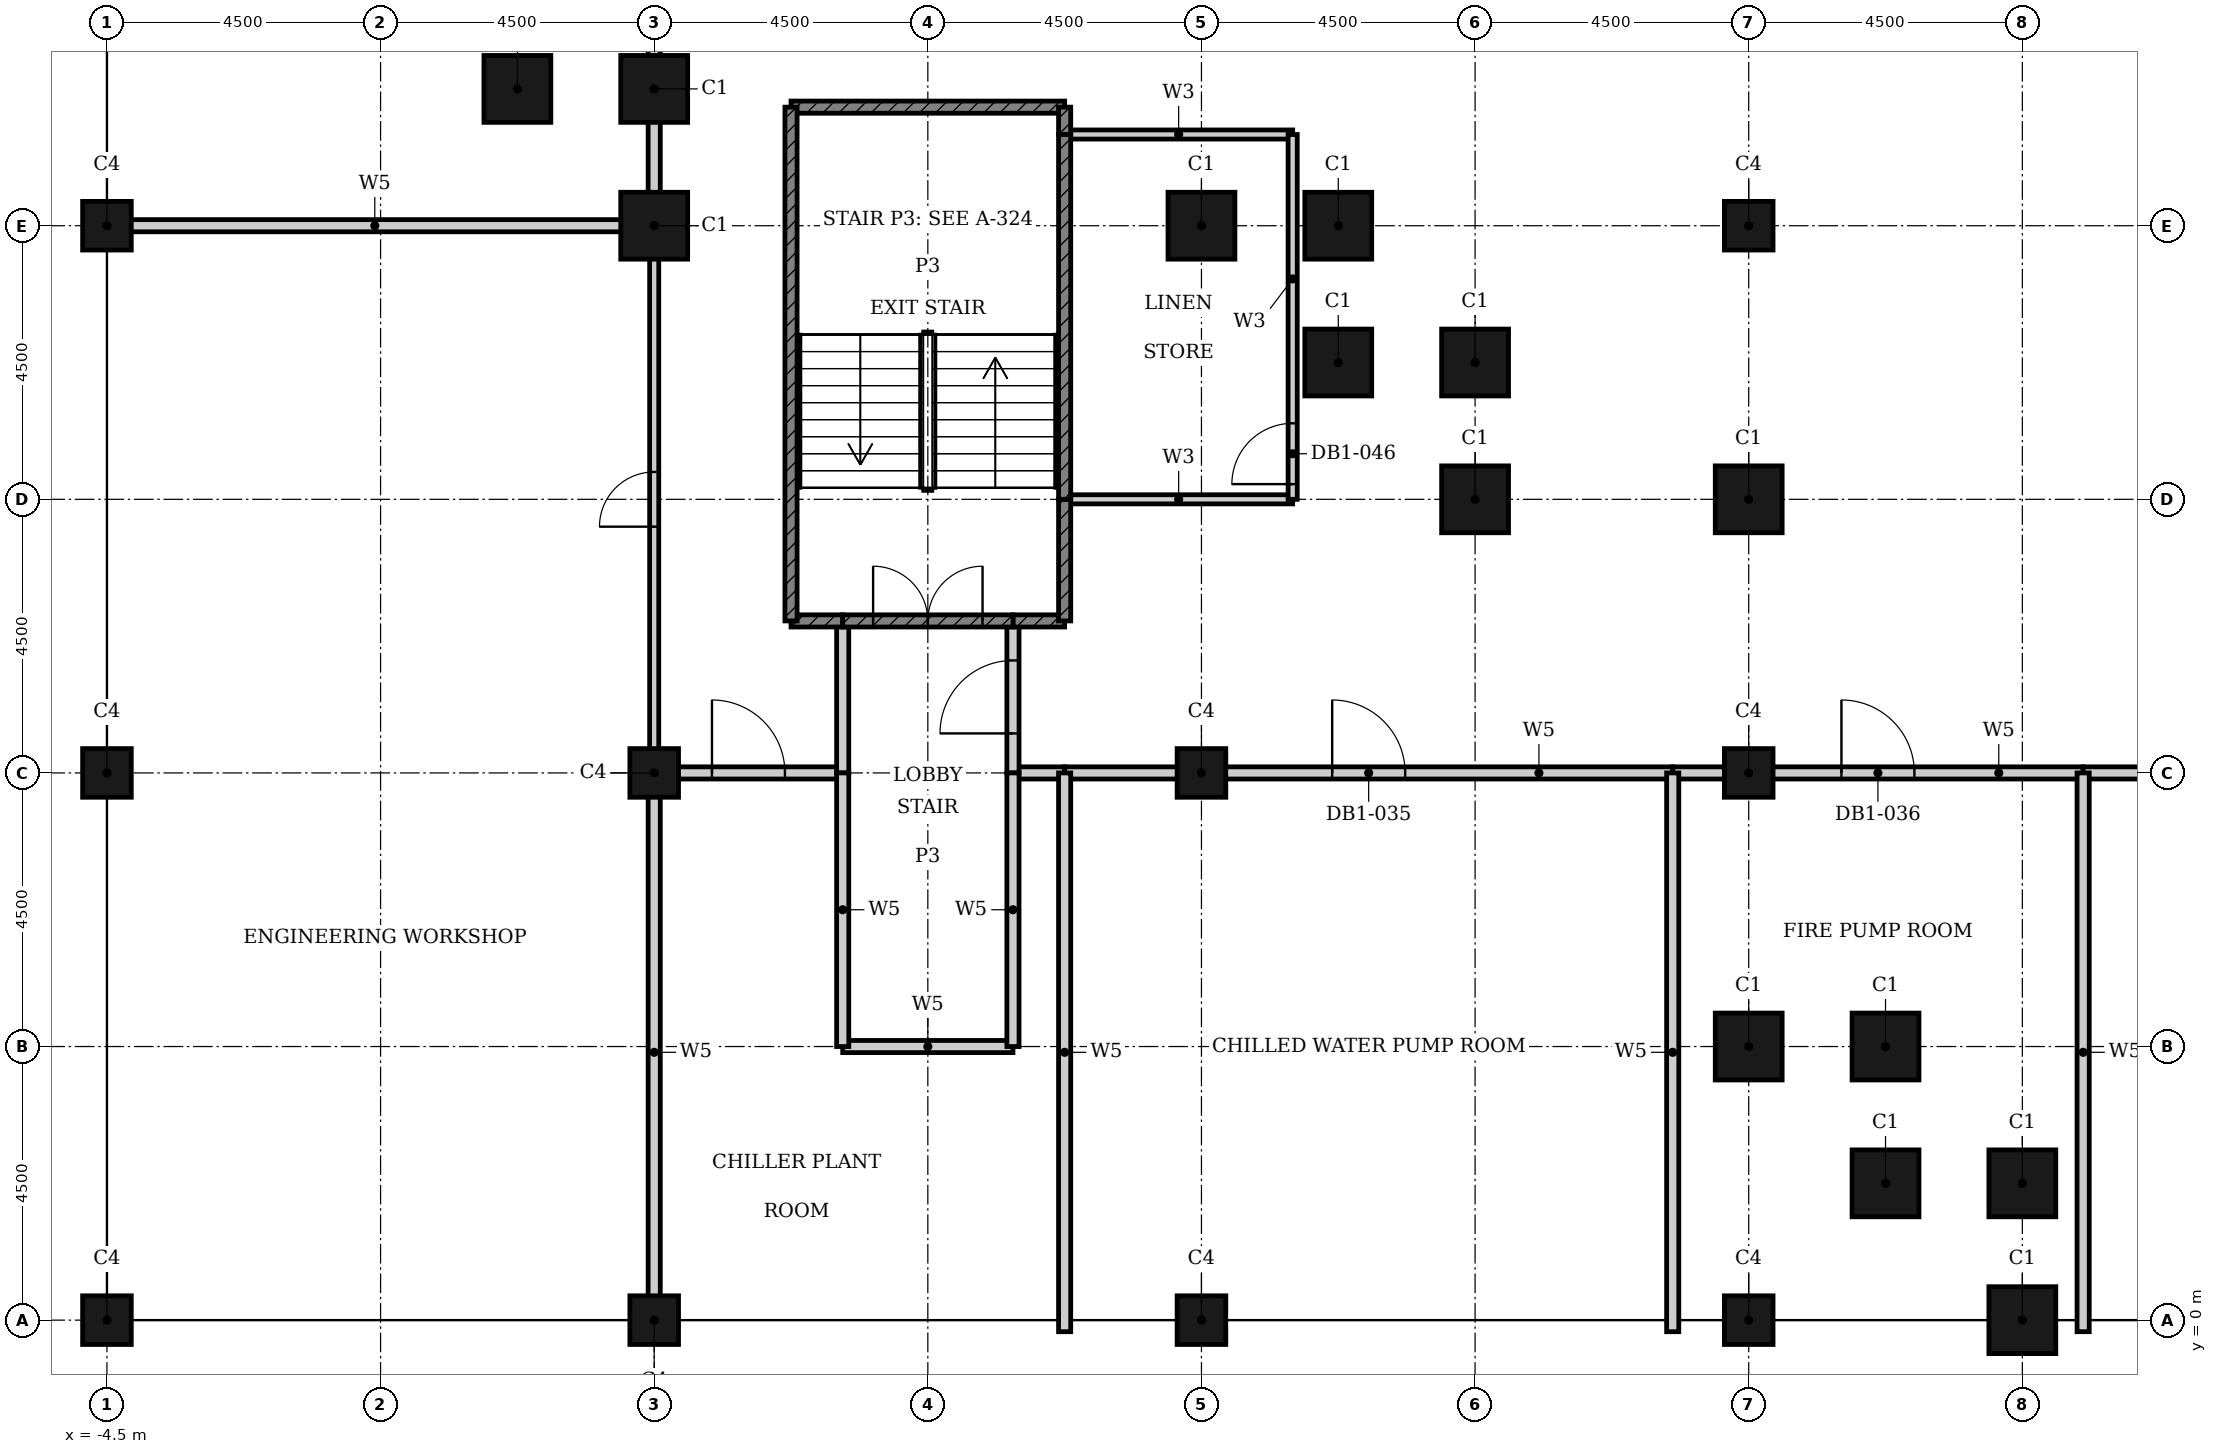
"""IFC4 building model, lengths in metres.
Left out: names, types, materials, properties, quantities, classifications, styles, units other than length and angle.
Written with IfcOpenShell. Run it as: python <this file> out.ifc"""

import sys

from ifc_helpers import new_model, si_unit, direction, frame, frame_2d, origin, origin_2d, place, context, subcontext, project, spatial, rectangle, hollow_rectangle, extrude, element, fill, save


model = new_model("IFC4")
c1 = context("Model", 3, precision=1e-05, world=origin(), true_north=direction((0.0, 1.0)))
c2 = subcontext(c1, "Body", "Model", "MODEL_VIEW")
j1 = project(units=[si_unit("LENGTHUNIT", "METRE"), si_unit("PLANEANGLEUNIT", "RADIAN")], contexts=[c1])
p1 = place(None, origin())
s1 = spatial("IfcSite", under=j1, at=p1, CompositionType="ELEMENT")
p2 = place(p1, origin())
s2 = spatial("IfcBuilding", under=s1, at=p2, CompositionType="ELEMENT")
p3 = place(p2, frame((0.0, 0.0, -6.0)))
s3 = spatial("IfcBuildingStorey", under=s2, at=p3, CompositionType="ELEMENT", Elevation=-6.0)
for number, where, z_axis, x_axis in (
    (1, (22.5, 4.5, -0.5), (0.0, 0.0, 1.0), (1.0, 0.0, 0.0)),
    (2, (24.75, 4.5, -0.5), (0.0, 0.0, 1.0), (1.0, 0.0, 0.0)),
    (3, (24.75, 2.25, -0.5), (0.0, 0.0, 1.0), (1.0, 0.0, 0.0)),
    (4, (27.0, 2.25, -0.5), (0.0, 0.0, 1.0), (1.0, 0.0, 0.0)),
    (5, (27.0, 0.0, -0.5), (0.0, 0.0, 1.0), (1.0, 0.0, 0.0)),
    (6, (2.25, 20.25, -0.5), (0.0, 0.0, 1.0), (1.0, 0.0, 0.0)),
    (7, (4.5, 20.25, -0.5), (0.0, 0.0, 1.0), (1.0, 0.0, 0.0)),
    (8, (4.5, 18.0, -0.5), (0.0, 0.0, 1.0), (1.0, 0.0, 0.0)),
    (9, (13.5, 18.0, -0.5), (0.0, 0.0, 1.0), (1.0, 0.0, 0.0)),
    (10, (15.75, 18.0, -0.5), (0.0, 0.0, 1.0), (1.0, 0.0, 0.0)),
    (11, (15.75, 15.75, -0.5), (0.0, 0.0, 1.0), (1.0, 0.0, 0.0)),
    (12, (18.0, 15.75, -0.5), (0.0, 0.0, 1.0), (1.0, 0.0, 0.0)),
    (13, (18.0, 13.5, -0.5), (0.0, 0.0, 1.0), (1.0, 0.0, 0.0)),
    (14, (22.5, 13.5, -0.5), (0.0, 0.0, 1.0), (1.0, 0.0, 0.0)),
):
    element("IfcColumn", number, at=place(p3, frame(where, z_axis=z_axis, x_axis=x_axis)), inside=s3, PredefinedType="COLUMN", context=c2, shape_type="SweptSolid", body=[
        extrude(hollow_rectangle(XDim=1.1, YDim=1.1, WallThickness=0.036, at=origin_2d()), origin(), (0.0, 0.0, 1.0), 6.5),
    ])
for number, where, z_axis, x_axis in (
    (15, (-4.5, 0.0, -0.5), (0.0, 0.0, 1.0), (1.0, 0.0, 0.0)),
    (16, (-4.5, 9.0, -0.5), (0.0, 0.0, 1.0), (1.0, 0.0, 0.0)),
    (17, (-4.5, 18.0, -0.5), (0.0, 0.0, 1.0), (1.0, 0.0, 0.0)),
    (18, (4.5, 0.0, -0.5), (0.0, 0.0, 1.0), (1.0, 0.0, 0.0)),
    (19, (13.5, 0.0, -0.5), (0.0, 0.0, 1.0), (1.0, 0.0, 0.0)),
    (20, (22.5, 0.0, -0.5), (0.0, 0.0, 1.0), (1.0, 0.0, 0.0)),
    (21, (4.5, 9.0, -0.5), (0.0, 0.0, 1.0), (1.0, 0.0, 0.0)),
    (22, (13.5, 9.0, -0.5), (0.0, 0.0, 1.0), (1.0, 0.0, 0.0)),
    (23, (22.5, 9.0, -0.5), (0.0, 0.0, 1.0), (1.0, 0.0, 0.0)),
    (24, (22.5, 18.0, -0.5), (0.0, 0.0, 1.0), (1.0, 0.0, 0.0)),
):
    element("IfcColumn", number, at=place(p3, frame(where, z_axis=z_axis, x_axis=x_axis)), inside=s3, PredefinedType="COLUMN", context=c2, shape_type="SweptSolid", body=[
        extrude(hollow_rectangle(XDim=0.8, YDim=0.8, WallThickness=0.025, at=origin_2d()), origin(), (0.0, 0.0, 1.0), 6.5),
    ])
for number, where, z_axis, x_axis in (
    (25, (11.25, 13.5, 0.0), (0.0, 0.0, 1.0), (1.0, 0.0, 0.0)),
    (26, (11.25, 19.5, 0.0), (0.0, 0.0, 1.0), (1.0, 0.0, 0.0)),
):
    element("IfcWall", number, at=place(p3, frame(where, z_axis=z_axis, x_axis=x_axis)), inside=s3, PredefinedType="PARTITIONING", context=c2, shape_type="SweptSolid", body=[
        extrude(rectangle(XDim=3.75, YDim=0.15, at=frame_2d((1.875, 0.0))), origin(), (0.0, 0.0, 1.0), 5.6),
    ])
p4 = place(p3, frame((15.0, 13.5, 0.0), z_axis=(0.0, 0.0, 1.0), x_axis=(0.0, 1.0, 0.0)))
e27 = element("IfcWall", 27, at=p4, inside=s3, PredefinedType="PARTITIONING", context=c2, shape_type="SweptSolid", body=[
    extrude(rectangle(XDim=6.0, YDim=0.15, at=frame_2d((3.0, 0.0))), origin(), (0.0, 0.0, 1.0), 5.6),
])
p5 = place(p4, frame((0.25, 0.0, 0.0)))
e28 = element("IfcOpeningElement", 28, at=p5, cuts=e27, PredefinedType="OPENING", context=c2, shape_type="SweptSolid", body=[
    extrude(rectangle(XDim=1.0, YDim=2.1, at=frame_2d((0.5, 1.05))), frame((0.0, 0.085, 0.0), z_axis=(0.0, -1.0, 0.0), x_axis=(1.0, 0.0, 0.0)), (0.0, 0.0, 1.0), 0.17),
])
p6 = place(p3, frame((4.5, 9.0, 0.0), z_axis=(0.0, 0.0, 1.0), x_axis=(0.0, 1.0, 0.0)))
e29 = element("IfcWall", 29, at=p6, inside=s3, PredefinedType="PARTITIONING", context=c2, shape_type="SweptSolid", body=[
    extrude(rectangle(XDim=9.0, YDim=0.15, at=frame_2d((4.5, 0.0))), origin(), (0.0, 0.0, 1.0), 5.6),
])
p7 = place(p6, frame((4.05, 0.0, 0.0)))
e30 = element("IfcOpeningElement", 30, at=p7, cuts=e29, PredefinedType="OPENING", context=c2, shape_type="SweptSolid", body=[
    extrude(rectangle(XDim=0.9, YDim=2.1, at=frame_2d((0.45, 1.05))), frame((0.0, 0.085, 0.0), z_axis=(0.0, -1.0, 0.0), x_axis=(1.0, 0.0, 0.0)), (0.0, 0.0, 1.0), 0.17),
])
p8 = place(p3, frame((-4.69, 18.0, 0.0), z_axis=(0.0, 0.0, 1.0), x_axis=(1.0, 0.0, 0.0)))
e31 = element("IfcWall", 31, at=p8, inside=s3, PredefinedType="PARTITIONING", context=c2, shape_type="SweptSolid", body=[
    extrude(rectangle(XDim=9.19, YDim=0.2, at=frame_2d((4.595, 0.0))), origin(), (0.0, 0.0, 1.0), 5.6),
])
p9 = place(p3, frame((7.6, 4.5, 0.0), z_axis=(0.0, 0.0, 1.0), x_axis=(1.0, 0.0, 0.0)))
e32 = element("IfcWall", 32, at=p9, inside=s3, PredefinedType="PARTITIONING", context=c2, shape_type="SweptSolid", body=[
    extrude(rectangle(XDim=2.8, YDim=0.2, at=frame_2d((1.4, 0.0))), origin(), (0.0, 0.0, 1.0), 5.6),
])
p10 = place(p3, frame((4.5, 9.0, 0.0), z_axis=(0.0, 0.0, 1.0), x_axis=(1.0, 0.0, 0.0)))
e33 = element("IfcWall", 33, at=p10, inside=s3, PredefinedType="PARTITIONING", context=c2, shape_type="SweptSolid", body=[
    extrude(rectangle(XDim=3.1, YDim=0.2, at=frame_2d((1.55, 0.0))), origin(), (0.0, 0.0, 1.0), 5.6),
])
p11 = place(p10, frame((0.95, 0.0, 0.0)))
e34 = element("IfcOpeningElement", 34, at=p11, cuts=e33, PredefinedType="OPENING", context=c2, shape_type="SweptSolid", body=[
    extrude(rectangle(XDim=1.2, YDim=2.1, at=frame_2d((0.6, 1.05))), frame((0.0, 0.11, 0.0), z_axis=(0.0, -1.0, 0.0), x_axis=(1.0, 0.0, 0.0)), (0.0, 0.0, 1.0), 0.22),
])
p12 = place(p3, frame((10.4, 9.0, 0.0), z_axis=(0.0, 0.0, 1.0), x_axis=(1.0, 0.0, 0.0)))
e35 = element("IfcWall", 35, at=p12, inside=s3, PredefinedType="PARTITIONING", context=c2, shape_type="SweptSolid", body=[
    extrude(rectangle(XDim=0.85, YDim=0.2, at=frame_2d((0.425, 0.0))), origin(), (0.0, 0.0, 1.0), 5.6),
])
p13 = place(p3, frame((11.25, 9.0, 0.0), z_axis=(0.0, 0.0, 1.0), x_axis=(1.0, 0.0, 0.0)))
e36 = element("IfcWall", 36, at=p13, inside=s3, PredefinedType="PARTITIONING", context=c2, shape_type="SweptSolid", body=[
    extrude(rectangle(XDim=10.0, YDim=0.2, at=frame_2d((5.0, 0.0))), origin(), (0.0, 0.0, 1.0), 5.6),
])
p14 = place(p13, frame((4.4, 0.0, 0.0)))
e37 = element("IfcOpeningElement", 37, at=p14, cuts=e36, PredefinedType="OPENING", context=c2, shape_type="SweptSolid", body=[
    extrude(rectangle(XDim=1.2, YDim=2.1, at=frame_2d((0.6, 1.05))), frame((0.0, 0.11, 0.0), z_axis=(0.0, -1.0, 0.0), x_axis=(1.0, 0.0, 0.0)), (0.0, 0.0, 1.0), 0.22),
])
p15 = place(p3, frame((21.25, 9.0, 0.0), z_axis=(0.0, 0.0, 1.0), x_axis=(1.0, 0.0, 0.0)))
e38 = element("IfcWall", 38, at=p15, inside=s3, PredefinedType="PARTITIONING", context=c2, shape_type="SweptSolid", body=[
    extrude(rectangle(XDim=6.75, YDim=0.2, at=frame_2d((3.375, 0.0))), origin(), (0.0, 0.0, 1.0), 5.6),
])
p16 = place(p15, frame((2.775, 0.0, 0.0)))
e39 = element("IfcOpeningElement", 39, at=p16, cuts=e38, PredefinedType="OPENING", context=c2, shape_type="SweptSolid", body=[
    extrude(rectangle(XDim=1.2, YDim=2.1, at=frame_2d((0.6, 1.05))), frame((0.0, 0.11, 0.0), z_axis=(0.0, -1.0, 0.0), x_axis=(1.0, 0.0, 0.0)), (0.0, 0.0, 1.0), 0.22),
])
p17 = place(p3, frame((28.0, 9.0, 0.0), z_axis=(0.0, 0.0, 1.0), x_axis=(1.0, 0.0, 0.0)))
e40 = element("IfcWall", 40, at=p17, inside=s3, PredefinedType="PARTITIONING", context=c2, shape_type="SweptSolid", body=[
    extrude(rectangle(XDim=10.0, YDim=0.2, at=frame_2d((5.0, 0.0))), origin(), (0.0, 0.0, 1.0), 5.6),
])
p18 = place(p17, frame((4.4, 0.0, 0.0)))
e41 = element("IfcOpeningElement", 41, at=p18, cuts=e40, PredefinedType="OPENING", context=c2, shape_type="SweptSolid", body=[
    extrude(rectangle(XDim=1.2, YDim=2.1, at=frame_2d((0.6, 1.05))), frame((0.0, 0.11, 0.0), z_axis=(0.0, -1.0, 0.0), x_axis=(1.0, 0.0, 0.0)), (0.0, 0.0, 1.0), 0.22),
])
p19 = place(p3, frame((10.4, 9.0, 0.0), z_axis=(0.0, 0.0, 1.0), x_axis=(0.0, 1.0, 0.0)))
e42 = element("IfcWall", 42, at=p19, inside=s3, PredefinedType="PARTITIONING", context=c2, shape_type="SweptSolid", body=[
    extrude(rectangle(XDim=2.5, YDim=0.2, at=frame_2d((1.25, 0.0))), origin(), (0.0, 0.0, 1.0), 5.6),
])
p20 = place(p19, frame((0.65, 0.0, 0.0)))
e43 = element("IfcOpeningElement", 43, at=p20, cuts=e42, PredefinedType="OPENING", context=c2, shape_type="SweptSolid", body=[
    extrude(rectangle(XDim=1.2, YDim=2.1, at=frame_2d((0.6, 1.05))), frame((0.0, 0.11, 0.0), z_axis=(0.0, -1.0, 0.0), x_axis=(1.0, 0.0, 0.0)), (0.0, 0.0, 1.0), 0.22),
])
p21 = place(p3, frame((10.4, 4.5, 0.0), z_axis=(0.0, 0.0, 1.0), x_axis=(0.0, 1.0, 0.0)))
e44 = element("IfcWall", 44, at=p21, inside=s3, PredefinedType="PARTITIONING", context=c2, shape_type="SweptSolid", body=[
    extrude(rectangle(XDim=4.5, YDim=0.2, at=frame_2d((2.25, 0.0))), origin(), (0.0, 0.0, 1.0), 5.6),
])
for number, where, z_axis, x_axis in (
    (45, (11.25, -0.19, 0.0), (0.0, 0.0, 1.0), (0.0, 1.0, 0.0)),
    (46, (21.25, -0.19, 0.0), (0.0, 0.0, 1.0), (0.0, 1.0, 0.0)),
    (47, (28.0, -0.19, 0.0), (0.0, 0.0, 1.0), (0.0, 1.0, 0.0)),
    (48, (4.5, -0.19, 0.0), (0.0, 0.0, 1.0), (0.0, 1.0, 0.0)),
):
    element("IfcWall", number, at=place(p3, frame(where, z_axis=z_axis, x_axis=x_axis)), inside=s3, PredefinedType="PARTITIONING", context=c2, shape_type="SweptSolid", body=[
        extrude(rectangle(XDim=9.19, YDim=0.2, at=frame_2d((4.595, 0.0))), origin(), (0.0, 0.0, 1.0), 5.6),
    ])
p22 = place(p3, frame((4.5, 18.0, 0.0), z_axis=(0.0, 0.0, 1.0), x_axis=(0.0, 1.0, 0.0)))
e49 = element("IfcWall", 49, at=p22, inside=s3, PredefinedType="PARTITIONING", context=c2, shape_type="SweptSolid", body=[
    extrude(rectangle(XDim=18.0, YDim=0.2, at=frame_2d((9.0, 0.0))), origin(), (0.0, 0.0, 1.0), 5.6),
])
p23 = place(p22, frame((9.75, 0.0, 0.0)))
e50 = element("IfcOpeningElement", 50, at=p23, cuts=e49, PredefinedType="OPENING", context=c2, shape_type="SweptSolid", body=[
    extrude(rectangle(XDim=1.2, YDim=2.1, at=frame_2d((0.6, 1.05))), frame((0.0, 0.11, 0.0), z_axis=(0.0, -1.0, 0.0), x_axis=(1.0, 0.0, 0.0)), (0.0, 0.0, 1.0), 0.22),
])
p24 = place(p3, frame((7.6, 9.0, 0.0), z_axis=(0.0, 0.0, 1.0), x_axis=(0.0, 1.0, 0.0)))
e51 = element("IfcWall", 51, at=p24, inside=s3, PredefinedType="PARTITIONING", context=c2, shape_type="SweptSolid", body=[
    extrude(rectangle(XDim=2.5, YDim=0.2, at=frame_2d((1.25, 0.0))), origin(), (0.0, 0.0, 1.0), 5.6),
])
p25 = place(p3, frame((7.6, 4.5, 0.0), z_axis=(0.0, 0.0, 1.0), x_axis=(0.0, 1.0, 0.0)))
e52 = element("IfcWall", 52, at=p25, inside=s3, PredefinedType="PARTITIONING", context=c2, shape_type="SweptSolid", body=[
    extrude(rectangle(XDim=4.5, YDim=0.2, at=frame_2d((2.25, 0.0))), origin(), (0.0, 0.0, 1.0), 5.6),
])
for number, where, z_axis, x_axis in (
    (53, (6.75, 11.5, 0.0), (0.0, 0.0, 1.0), (1.0, 0.0, 0.0)),
    (54, (10.4, 11.5, 0.0), (0.0, 0.0, 1.0), (1.0, 0.0, 0.0)),
):
    element("IfcWall", number, at=place(p3, frame(where, z_axis=z_axis, x_axis=x_axis)), inside=s3, PredefinedType="SHEAR", context=c2, shape_type="SweptSolid", body=[
        extrude(rectangle(XDim=0.85, YDim=0.2, at=frame_2d((0.425, 0.0))), origin(), (0.0, 0.0, 1.0), 5.6),
    ])
p26 = place(p3, frame((7.6, 11.5, 0.0), z_axis=(0.0, 0.0, 1.0), x_axis=(1.0, 0.0, 0.0)))
e55 = element("IfcWall", 55, at=p26, inside=s3, PredefinedType="SHEAR", context=c2, shape_type="SweptSolid", body=[
    extrude(rectangle(XDim=2.8, YDim=0.2, at=frame_2d((1.4, 0.0))), origin(), (0.0, 0.0, 1.0), 5.6),
])
p27 = place(p26, frame((0.5, 0.0, 0.0)))
e56 = element("IfcOpeningElement", 56, at=p27, cuts=e55, PredefinedType="OPENING", context=c2, shape_type="SweptSolid", body=[
    extrude(rectangle(XDim=1.8, YDim=2.1, at=frame_2d((0.9, 1.05))), frame((0.0, 0.11, 0.0), z_axis=(0.0, -1.0, 0.0), x_axis=(1.0, 0.0, 0.0)), (0.0, 0.0, 1.0), 0.22),
])
p28 = place(p3, frame((6.75, 19.95, 0.0), z_axis=(0.0, 0.0, 1.0), x_axis=(1.0, 0.0, 0.0)))
e57 = element("IfcWall", 57, at=p28, inside=s3, PredefinedType="SHEAR", context=c2, shape_type="SweptSolid", body=[
    extrude(rectangle(XDim=4.5, YDim=0.2, at=frame_2d((2.25, 0.0))), origin(), (0.0, 0.0, 1.0), 5.6),
])
p29 = place(p3, frame((11.25, 11.5, 0.0), z_axis=(0.0, 0.0, 1.0), x_axis=(0.0, 1.0, 0.0)))
e58 = element("IfcWall", 58, at=p29, inside=s3, PredefinedType="SHEAR", context=c2, shape_type="SweptSolid", body=[
    extrude(rectangle(XDim=2.0, YDim=0.2, at=frame_2d((1.0, 0.0))), origin(), (0.0, 0.0, 1.0), 5.6),
])
p30 = place(p3, frame((11.25, 19.5, 0.0), z_axis=(0.0, 0.0, 1.0), x_axis=(0.0, 1.0, 0.0)))
e59 = element("IfcWall", 59, at=p30, inside=s3, PredefinedType="SHEAR", context=c2, shape_type="SweptSolid", body=[
    extrude(rectangle(XDim=0.45, YDim=0.2, at=frame_2d((0.225, 0.0))), origin(), (0.0, 0.0, 1.0), 5.6),
])
p31 = place(p3, frame((11.25, 13.5, 0.0), z_axis=(0.0, 0.0, 1.0), x_axis=(0.0, 1.0, 0.0)))
e60 = element("IfcWall", 60, at=p31, inside=s3, PredefinedType="SHEAR", context=c2, shape_type="SweptSolid", body=[
    extrude(rectangle(XDim=6.0, YDim=0.2, at=frame_2d((3.0, 0.0))), origin(), (0.0, 0.0, 1.0), 5.6),
])
p32 = place(p3, frame((6.75, 11.5, 0.0), z_axis=(0.0, 0.0, 1.0), x_axis=(0.0, 1.0, 0.0)))
e61 = element("IfcWall", 61, at=p32, inside=s3, PredefinedType="SHEAR", context=c2, shape_type="SweptSolid", body=[
    extrude(rectangle(XDim=8.45, YDim=0.2, at=frame_2d((4.225, 0.0))), origin(), (0.0, 0.0, 1.0), 5.6),
])
p33 = place(p20, origin())
e62 = element("IfcDoor", 62, at=p33, inside=s3, OperationType="SINGLE_SWING_LEFT", PredefinedType="DOOR", context=c2, shape_type="SweptSolid", body=[
    extrude(rectangle(XDim=1.2, YDim=2.1, at=frame_2d((0.6, 1.05))), frame((0.0, 0.025, 0.0), z_axis=(0.0, -1.0, 0.0), x_axis=(1.0, 0.0, 0.0)), (0.0, 0.0, 1.0), 0.05),
])
fill(e43, e62)
p34 = place(p27, origin())
e63 = element("IfcDoor", 63, at=p34, inside=s3, OperationType="DOUBLE_DOOR_SINGLE_SWING", PredefinedType="DOOR", context=c2, shape_type="SweptSolid", body=[
    extrude(rectangle(XDim=1.8, YDim=2.1, at=frame_2d((0.9, 1.05))), frame((0.0, 0.025, 0.0), z_axis=(0.0, -1.0, 0.0), x_axis=(1.0, 0.0, 0.0)), (0.0, 0.0, 1.0), 0.05),
])
fill(e56, e63)
p35 = place(p7, origin())
e64 = element("IfcDoor", 64, at=p35, inside=s3, OperationType="SINGLE_SWING_RIGHT", PredefinedType="DOOR", context=c2, shape_type="SweptSolid", body=[
    extrude(rectangle(XDim=0.9, YDim=2.1, at=frame_2d((0.45, 1.05))), frame((0.0, 0.025, 0.0), z_axis=(0.0, -1.0, 0.0), x_axis=(1.0, 0.0, 0.0)), (0.0, 0.0, 1.0), 0.05),
])
fill(e30, e64)
p36 = place(p11, origin())
e65 = element("IfcDoor", 65, at=p36, inside=s3, OperationType="SINGLE_SWING_RIGHT", PredefinedType="DOOR", context=c2, shape_type="SweptSolid", body=[
    extrude(rectangle(XDim=1.2, YDim=2.1, at=frame_2d((0.6, 1.05))), frame((0.0, 0.025, 0.0), z_axis=(0.0, -1.0, 0.0), x_axis=(1.0, 0.0, 0.0)), (0.0, 0.0, 1.0), 0.05),
])
fill(e34, e65)
p37 = place(p14, origin())
e66 = element("IfcDoor", 66, at=p37, inside=s3, OperationType="SINGLE_SWING_LEFT", PredefinedType="DOOR", context=c2, shape_type="SweptSolid", body=[
    extrude(rectangle(XDim=1.2, YDim=2.1, at=frame_2d((0.6, 1.05))), frame((0.0, 0.025, 0.0), z_axis=(0.0, -1.0, 0.0), x_axis=(1.0, 0.0, 0.0)), (0.0, 0.0, 1.0), 0.05),
])
fill(e37, e66)
p38 = place(p16, origin())
e67 = element("IfcDoor", 67, at=p38, inside=s3, OperationType="SINGLE_SWING_LEFT", PredefinedType="DOOR", context=c2, shape_type="SweptSolid", body=[
    extrude(rectangle(XDim=1.2, YDim=2.1, at=frame_2d((0.6, 1.05))), frame((0.0, 0.025, 0.0), z_axis=(0.0, -1.0, 0.0), x_axis=(1.0, 0.0, 0.0)), (0.0, 0.0, 1.0), 0.05),
])
fill(e39, e67)
p39 = place(p5, origin())
e68 = element("IfcDoor", 68, at=p39, inside=s3, OperationType="SINGLE_SWING_LEFT", PredefinedType="DOOR", context=c2, shape_type="SweptSolid", body=[
    extrude(rectangle(XDim=1.0, YDim=2.1, at=frame_2d((0.5, 1.05))), frame((0.0, 0.025, 0.0), z_axis=(0.0, -1.0, 0.0), x_axis=(1.0, 0.0, 0.0)), (0.0, 0.0, 1.0), 0.05),
])
fill(e28, e68)
save(model, sys.argv[1])
